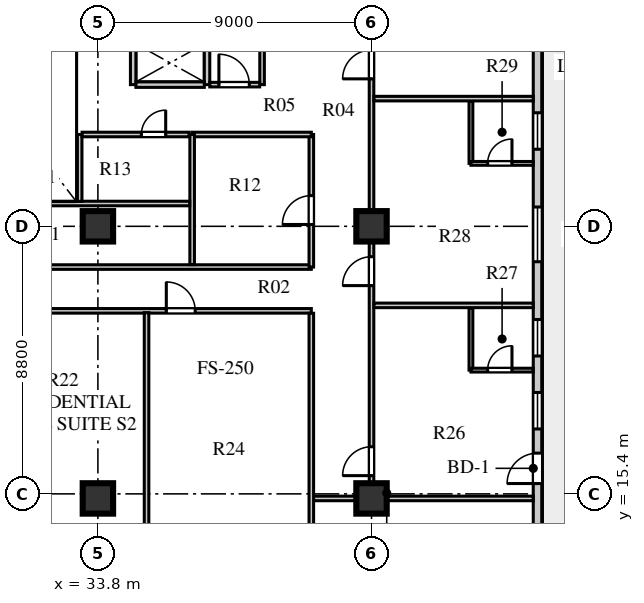
"""IFC4 building model, lengths in metres.
Left out: names, types, materials, properties, quantities, classifications, styles, units other than length and angle.
Written with IfcOpenShell. Run it as: python <this file> out.ifc"""

import sys

from ifc_helpers import new_model, si_unit, direction, frame, frame_2d, origin, origin_2d, place, context, subcontext, project, spatial, rectangle, extrude, element, fill, save


model = new_model("IFC4")
c1 = context("Model", 3, precision=1e-05, world=origin(), true_north=direction((0.0, 1.0)))
c2 = subcontext(c1, "Body", "Model", "MODEL_VIEW")
j1 = project(units=[si_unit("LENGTHUNIT", "METRE"), si_unit("PLANEANGLEUNIT", "RADIAN")], contexts=[c1])
p1 = place(None, origin())
s1 = spatial("IfcSite", under=j1, at=p1, CompositionType="ELEMENT")
p2 = place(p1, origin())
s2 = spatial("IfcBuilding", under=s1, at=p2, CompositionType="ELEMENT")
p3 = place(p2, frame((0.0, 0.0, 134.8)))
s3 = spatial("IfcBuildingStorey", under=s2, at=p3, CompositionType="ELEMENT", Elevation=134.8)
for number, where, z_axis, x_axis in (
    (1, (33.8, 15.25, 0.0), (0.0, 0.0, 1.0), (1.0, 0.0, 0.0)),
    (2, (33.8, 24.2, 0.0), (0.0, 0.0, 1.0), (1.0, 0.0, 0.0)),
    (3, (42.8, 15.25, 0.0), (0.0, 0.0, 1.0), (1.0, 0.0, 0.0)),
    (4, (42.8, 24.2, 0.0), (0.0, 0.0, 1.0), (1.0, 0.0, 0.0)),
):
    element("IfcColumn", number, at=place(p3, frame(where, z_axis=z_axis, x_axis=x_axis)), inside=s3, PredefinedType="COLUMN", context=c2, shape_type="SweptSolid", body=[
        extrude(rectangle(XDim=1.0, YDim=1.0, at=origin_2d()), origin(), (0.0, 0.0, 1.0), 3.6),
    ])
p4 = place(p3, frame((48.26, 13.33, 0.0), z_axis=(0.0, 0.0, 1.0), x_axis=(0.0, 1.0, 0.0)))
e5 = element("IfcWall", 5, at=p4, inside=s3, PredefinedType="STANDARD", context=c2, shape_type="SweptSolid", body=[
    extrude(rectangle(XDim=30.54, YDim=0.28, at=frame_2d((15.27, 0.0))), origin(), (0.0, 0.0, 1.0), 3.6),
])
p5 = place(p4, frame((2.41, 0.0, 0.0)))
e6 = element("IfcOpeningElement", 6, at=p5, cuts=e5, PredefinedType="OPENING", context=c2, shape_type="SweptSolid", body=[
    extrude(rectangle(XDim=1.0, YDim=2.05, at=frame_2d((0.5, 1.025))), frame((0.0, 0.15, 0.0), z_axis=(0.0, -1.0, 0.0), x_axis=(1.0, 0.0, 0.0)), (0.0, 0.0, 1.0), 0.3),
])
p6 = place(p4, frame((4.205, 0.0, 0.8)))
e7 = element("IfcOpeningElement", 7, at=p6, cuts=e5, PredefinedType="OPENING", context=c2, shape_type="SweptSolid", body=[
    extrude(rectangle(XDim=1.2, YDim=1.75, at=frame_2d((0.6, 0.875))), frame((0.0, 0.15, 0.0), z_axis=(0.0, -1.0, 0.0), x_axis=(1.0, 0.0, 0.0)), (0.0, 0.0, 1.0), 0.3),
])
p7 = place(p4, frame((6.605, 0.0, 0.8)))
e8 = element("IfcOpeningElement", 8, at=p7, cuts=e5, PredefinedType="OPENING", context=c2, shape_type="SweptSolid", body=[
    extrude(rectangle(XDim=1.2, YDim=1.75, at=frame_2d((0.6, 0.875))), frame((0.0, 0.15, 0.0), z_axis=(0.0, -1.0, 0.0), x_axis=(1.0, 0.0, 0.0)), (0.0, 0.0, 1.0), 0.3),
])
p8 = place(p4, frame((9.705, 0.0, 0.8)))
e9 = element("IfcOpeningElement", 9, at=p8, cuts=e5, PredefinedType="OPENING", context=c2, shape_type="SweptSolid", body=[
    extrude(rectangle(XDim=1.8, YDim=2.0, at=frame_2d((0.9, 1.0))), frame((0.0, 0.15, 0.0), z_axis=(0.0, -1.0, 0.0), x_axis=(1.0, 0.0, 0.0)), (0.0, 0.0, 1.0), 0.3),
])
p9 = place(p4, frame((13.405, 0.0, 0.8)))
e10 = element("IfcOpeningElement", 10, at=p9, cuts=e5, PredefinedType="OPENING", context=c2, shape_type="SweptSolid", body=[
    extrude(rectangle(XDim=1.2, YDim=1.75, at=frame_2d((0.6, 0.875))), frame((0.0, 0.15, 0.0), z_axis=(0.0, -1.0, 0.0), x_axis=(1.0, 0.0, 0.0)), (0.0, 0.0, 1.0), 0.3),
])
p10 = place(p4, frame((16.805, 0.0, 0.8)))
e11 = element("IfcOpeningElement", 11, at=p10, cuts=e5, PredefinedType="OPENING", context=c2, shape_type="SweptSolid", body=[
    extrude(rectangle(XDim=1.2, YDim=1.75, at=frame_2d((0.6, 0.875))), frame((0.0, 0.15, 0.0), z_axis=(0.0, -1.0, 0.0), x_axis=(1.0, 0.0, 0.0)), (0.0, 0.0, 1.0), 0.3),
])
p11 = place(p4, frame((20.205, 0.0, 0.8)))
e12 = element("IfcOpeningElement", 12, at=p11, cuts=e5, PredefinedType="OPENING", context=c2, shape_type="SweptSolid", body=[
    extrude(rectangle(XDim=1.2, YDim=1.75, at=frame_2d((0.6, 0.875))), frame((0.0, 0.15, 0.0), z_axis=(0.0, -1.0, 0.0), x_axis=(1.0, 0.0, 0.0)), (0.0, 0.0, 1.0), 0.3),
])
p12 = place(p4, frame((23.08, 0.0, 0.8)))
e13 = element("IfcOpeningElement", 13, at=p12, cuts=e5, PredefinedType="OPENING", context=c2, shape_type="SweptSolid", body=[
    extrude(rectangle(XDim=2.1, YDim=1.95, at=frame_2d((1.05, 0.975))), frame((0.0, 0.15, 0.0), z_axis=(0.0, -1.0, 0.0), x_axis=(1.0, 0.0, 0.0)), (0.0, 0.0, 1.0), 0.3),
])
p13 = place(p4, frame((26.905, 0.0, 0.8)))
e14 = element("IfcOpeningElement", 14, at=p13, cuts=e5, PredefinedType="OPENING", context=c2, shape_type="SweptSolid", body=[
    extrude(rectangle(XDim=1.2, YDim=1.75, at=frame_2d((0.6, 0.875))), frame((0.0, 0.15, 0.0), z_axis=(0.0, -1.0, 0.0), x_axis=(1.0, 0.0, 0.0)), (0.0, 0.0, 1.0), 0.3),
])
p14 = place(p3, frame((34.96, 28.86, 0.0), z_axis=(0.0, 0.0, 1.0), x_axis=(0.0, 1.0, 0.0)))
e15 = element("IfcWall", 15, at=p14, inside=s3, PredefinedType="SOLIDWALL", context=c2, shape_type="SweptSolid", body=[
    extrude(rectangle(XDim=4.22, YDim=0.18, at=frame_2d((2.11, 0.0))), origin(), (0.0, 0.0, 1.0), 3.6),
])
p15 = place(p3, frame((37.39, 28.86, 0.0), z_axis=(0.0, 0.0, 1.0), x_axis=(0.0, 1.0, 0.0)))
e16 = element("IfcWall", 16, at=p15, inside=s3, PredefinedType="SOLIDWALL", context=c2, shape_type="SweptSolid", body=[
    extrude(rectangle(XDim=4.22, YDim=0.18, at=frame_2d((2.11, 0.0))), origin(), (0.0, 0.0, 1.0), 3.6),
])
p16 = place(p15, frame((2.1, 0.0, 0.0)))
e17 = element("IfcOpeningElement", 17, at=p16, cuts=e16, PredefinedType="OPENING", context=c2, shape_type="SweptSolid", body=[
    extrude(rectangle(XDim=1.2, YDim=2.12, at=frame_2d((0.6, 1.06))), frame((0.0, 0.1, 0.0), z_axis=(0.0, -1.0, 0.0), x_axis=(1.0, 0.0, 0.0)), (0.0, 0.0, 1.0), 0.2),
])
p17 = place(p3, frame((35.05, 28.86, 0.0), z_axis=(0.0, 0.0, 1.0), x_axis=(1.0, 0.0, 0.0)))
e18 = element("IfcWall", 18, at=p17, inside=s3, PredefinedType="SOLIDWALL", context=c2, shape_type="SweptSolid", body=[
    extrude(rectangle(XDim=2.25, YDim=0.18, at=frame_2d((1.125, 0.0))), origin(), (0.0, 0.0, 1.0), 3.6),
])
p18 = place(p3, frame((39.2, 28.86, 0.0), z_axis=(0.0, 0.0, 1.0), x_axis=(0.0, 1.0, 0.0)))
e19 = element("IfcWall", 19, at=p18, inside=s3, PredefinedType="PARTITIONING", context=c2, shape_type="SweptSolid", body=[
    extrude(rectangle(XDim=4.22, YDim=0.15, at=frame_2d((2.11, 0.0))), origin(), (0.0, 0.0, 1.0), 3.6),
])
p19 = place(p3, frame((37.48, 28.86, 0.0), z_axis=(0.0, 0.0, 1.0), x_axis=(1.0, 0.0, 0.0)))
e20 = element("IfcWall", 20, at=p19, inside=s3, PredefinedType="PARTITIONING", context=c2, shape_type="SweptSolid", body=[
    extrude(rectangle(XDim=1.64, YDim=0.15, at=frame_2d((0.82, 0.0))), origin(), (0.0, 0.0, 1.0), 3.6),
])
p20 = place(p19, frame((0.3, 0.0, 0.0)))
e21 = element("IfcOpeningElement", 21, at=p20, cuts=e20, PredefinedType="OPENING", context=c2, shape_type="SweptSolid", body=[
    extrude(rectangle(XDim=1.0, YDim=2.1, at=frame_2d((0.5, 1.05))), frame((0.0, 0.085, 0.0), z_axis=(0.0, -1.0, 0.0), x_axis=(1.0, 0.0, 0.0)), (0.0, 0.0, 1.0), 0.17),
])
p21 = place(p3, frame((25.22, 21.42, 0.0), z_axis=(0.0, 0.0, 1.0), x_axis=(1.0, 0.0, 0.0)))
e22 = element("IfcWall", 22, at=p21, inside=s3, PredefinedType="PARTITIONING", context=c2, shape_type="SweptSolid", body=[
    extrude(rectangle(XDim=15.6, YDim=0.15, at=frame_2d((7.8, 0.0))), origin(), (0.0, 0.0, 1.0), 3.2),
])
p22 = place(p21, frame((0.73, 0.0, 0.0)))
e23 = element("IfcOpeningElement", 23, at=p22, cuts=e22, PredefinedType="OPENING", context=c2, shape_type="SweptSolid", body=[
    extrude(rectangle(XDim=0.95, YDim=2.1, at=frame_2d((0.475, 1.05))), frame((0.0, 0.085, 0.0), z_axis=(0.0, -1.0, 0.0), x_axis=(1.0, 0.0, 0.0)), (0.0, 0.0, 1.0), 0.17),
])
p23 = place(p21, frame((5.23, 0.0, 0.0)))
e24 = element("IfcOpeningElement", 24, at=p23, cuts=e22, PredefinedType="OPENING", context=c2, shape_type="SweptSolid", body=[
    extrude(rectangle(XDim=0.95, YDim=2.1, at=frame_2d((0.475, 1.05))), frame((0.0, 0.085, 0.0), z_axis=(0.0, -1.0, 0.0), x_axis=(1.0, 0.0, 0.0)), (0.0, 0.0, 1.0), 0.17),
])
p24 = place(p21, frame((10.83, 0.0, 0.0)))
e25 = element("IfcOpeningElement", 25, at=p24, cuts=e22, PredefinedType="OPENING", context=c2, shape_type="SweptSolid", body=[
    extrude(rectangle(XDim=0.95, YDim=2.1, at=frame_2d((0.475, 1.05))), frame((0.0, 0.085, 0.0), z_axis=(0.0, -1.0, 0.0), x_axis=(1.0, 0.0, 0.0)), (0.0, 0.0, 1.0), 0.17),
])
p25 = place(p3, frame((27.15, 22.86, 0.0), z_axis=(0.0, 0.0, 1.0), x_axis=(1.0, 0.0, 0.0)))
e26 = element("IfcWall", 26, at=p25, inside=s3, PredefinedType="PARTITIONING", context=c2, shape_type="SweptSolid", body=[
    extrude(rectangle(XDim=13.67, YDim=0.15, at=frame_2d((6.835, 0.0))), origin(), (0.0, 0.0, 1.0), 3.6),
])
p26 = place(p25, frame((2.2, 0.0, 0.0)))
e27 = element("IfcOpeningElement", 27, at=p26, cuts=e26, PredefinedType="OPENING", context=c2, shape_type="SweptSolid", body=[
    extrude(rectangle(XDim=0.9, YDim=2.08, at=frame_2d((0.45, 1.04))), frame((0.0, 0.085, 0.0), z_axis=(0.0, -1.0, 0.0), x_axis=(1.0, 0.0, 0.0)), (0.0, 0.0, 1.0), 0.17),
])
p27 = place(p3, frame((42.8, 15.25, 0.0), z_axis=(0.0, 0.0, 1.0), x_axis=(0.0, 1.0, 0.0)))
e28 = element("IfcWall", 28, at=p27, inside=s3, PredefinedType="PARTITIONING", context=c2, shape_type="SweptSolid", body=[
    extrude(rectangle(XDim=26.7, YDim=0.15, at=frame_2d((13.35, 0.0))), origin(), (0.0, 0.0, 1.0), 2.95),
])
p28 = place(p27, frame((0.75, 0.0, 0.0)))
e29 = element("IfcOpeningElement", 29, at=p28, cuts=e28, PredefinedType="OPENING", context=c2, shape_type="SweptSolid", body=[
    extrude(rectangle(XDim=0.95, YDim=2.1, at=frame_2d((0.475, 1.05))), frame((0.0, 0.085, 0.0), z_axis=(0.0, -1.0, 0.0), x_axis=(1.0, 0.0, 0.0)), (0.0, 0.0, 1.0), 0.17),
])
p29 = place(p27, frame((7.0, 0.0, 0.0)))
e30 = element("IfcOpeningElement", 30, at=p29, cuts=e28, PredefinedType="OPENING", context=c2, shape_type="SweptSolid", body=[
    extrude(rectangle(XDim=0.95, YDim=2.1, at=frame_2d((0.475, 1.05))), frame((0.0, 0.085, 0.0), z_axis=(0.0, -1.0, 0.0), x_axis=(1.0, 0.0, 0.0)), (0.0, 0.0, 1.0), 0.17),
])
p30 = place(p27, frame((13.8, 0.0, 0.0)))
e31 = element("IfcOpeningElement", 31, at=p30, cuts=e28, PredefinedType="OPENING", context=c2, shape_type="SweptSolid", body=[
    extrude(rectangle(XDim=0.95, YDim=2.1, at=frame_2d((0.475, 1.05))), frame((0.0, 0.085, 0.0), z_axis=(0.0, -1.0, 0.0), x_axis=(1.0, 0.0, 0.0)), (0.0, 0.0, 1.0), 0.17),
])
p31 = place(p27, frame((20.6, 0.0, 0.0)))
e32 = element("IfcOpeningElement", 32, at=p31, cuts=e28, PredefinedType="OPENING", context=c2, shape_type="SweptSolid", body=[
    extrude(rectangle(XDim=0.95, YDim=2.1, at=frame_2d((0.475, 1.05))), frame((0.0, 0.085, 0.0), z_axis=(0.0, -1.0, 0.0), x_axis=(1.0, 0.0, 0.0)), (0.0, 0.0, 1.0), 0.17),
])
p32 = place(p3, frame((40.82, 15.25, 0.0), z_axis=(0.0, 0.0, 1.0), x_axis=(1.0, 0.0, 0.0)))
e33 = element("IfcWall", 33, at=p32, inside=s3, PredefinedType="PARTITIONING", context=c2, shape_type="SweptSolid", body=[
    extrude(rectangle(XDim=7.3, YDim=0.15, at=frame_2d((3.65, 0.0))), origin(), (0.0, 0.0, 1.0), 2.95),
])
p33 = place(p3, frame((40.82, 22.86, 0.0), z_axis=(0.0, 0.0, 1.0), x_axis=(0.0, 1.0, 0.0)))
e34 = element("IfcWall", 34, at=p33, inside=s3, PredefinedType="PARTITIONING", context=c2, shape_type="SweptSolid", body=[
    extrude(rectangle(XDim=4.36, YDim=0.15, at=frame_2d((2.18, 0.0))), origin(), (0.0, 0.0, 1.0), 3.6),
])
p34 = place(p33, frame((1.4, 0.0, 0.0)))
e35 = element("IfcOpeningElement", 35, at=p34, cuts=e34, PredefinedType="OPENING", context=c2, shape_type="SweptSolid", body=[
    extrude(rectangle(XDim=0.95, YDim=2.1, at=frame_2d((0.475, 1.05))), frame((0.0, 0.085, 0.0), z_axis=(0.0, -1.0, 0.0), x_axis=(1.0, 0.0, 0.0)), (0.0, 0.0, 1.0), 0.17),
])
p35 = place(p3, frame((36.9, 27.22, 0.0), z_axis=(0.0, 0.0, 1.0), x_axis=(1.0, 0.0, 0.0)))
e36 = element("IfcWall", 36, at=p35, inside=s3, PredefinedType="PARTITIONING", context=c2, shape_type="SweptSolid", body=[
    extrude(rectangle(XDim=3.92, YDim=0.15, at=frame_2d((1.96, 0.0))), origin(), (0.0, 0.0, 1.0), 3.2),
])
p36 = place(p3, frame((36.9, 22.94, 0.0), z_axis=(0.0, 0.0, 1.0), x_axis=(0.0, 1.0, 0.0)))
e37 = element("IfcWall", 37, at=p36, inside=s3, PredefinedType="PARTITIONING", context=c2, shape_type="SweptSolid", body=[
    extrude(rectangle(XDim=4.28, YDim=0.15, at=frame_2d((2.14, 0.0))), origin(), (0.0, 0.0, 1.0), 3.6),
])
p37 = place(p3, frame((27.15, 24.95, 0.0), z_axis=(0.0, 0.0, 1.0), x_axis=(1.0, 0.0, 0.0)))
e38 = element("IfcWall", 38, at=p37, inside=s3, PredefinedType="PARTITIONING", context=c2, shape_type="SweptSolid", body=[
    extrude(rectangle(XDim=9.67, YDim=0.15, at=frame_2d((4.835, 0.0))), origin(), (0.0, 0.0, 1.0), 3.05),
])
p38 = place(p3, frame((33.2, 25.02, 0.0), z_axis=(0.0, 0.0, 1.0), x_axis=(0.0, 1.0, 0.0)))
e39 = element("IfcWall", 39, at=p38, inside=s3, PredefinedType="PARTITIONING", context=c2, shape_type="SweptSolid", body=[
    extrude(rectangle(XDim=2.2, YDim=0.15, at=frame_2d((1.1, 0.0))), origin(), (0.0, 0.0, 1.0), 3.05),
])
p39 = place(p3, frame((33.28, 27.22, 0.0), z_axis=(0.0, 0.0, 1.0), x_axis=(1.0, 0.0, 0.0)))
e40 = element("IfcWall", 40, at=p39, inside=s3, PredefinedType="PARTITIONING", context=c2, shape_type="SweptSolid", body=[
    extrude(rectangle(XDim=3.52, YDim=0.15, at=frame_2d((1.76, 0.0))), origin(), (0.0, 0.0, 1.0), 3.2),
])
p40 = place(p39, frame((1.95, 0.0, 0.0)))
e41 = element("IfcOpeningElement", 41, at=p40, cuts=e40, PredefinedType="OPENING", context=c2, shape_type="SweptSolid", body=[
    extrude(rectangle(XDim=0.8, YDim=2.05, at=frame_2d((0.4, 1.025))), frame((0.0, 0.085, 0.0), z_axis=(0.0, -1.0, 0.0), x_axis=(1.0, 0.0, 0.0)), (0.0, 0.0, 1.0), 0.17),
])
p41 = place(p3, frame((40.82, 10.28, 0.0), z_axis=(0.0, 0.0, 1.0), x_axis=(0.0, 1.0, 0.0)))
e42 = element("IfcWall", 42, at=p41, inside=s3, PredefinedType="PARTITIONING", context=c2, shape_type="SweptSolid", body=[
    extrude(rectangle(XDim=11.06, YDim=0.15, at=frame_2d((5.53, 0.0))), origin(), (0.0, 0.0, 1.0), 3.6),
])
p42 = place(p3, frame((35.4, 10.28, 0.0), z_axis=(0.0, 0.0, 1.0), x_axis=(0.0, 1.0, 0.0)))
e43 = element("IfcWall", 43, at=p42, inside=s3, PredefinedType="PARTITIONING", context=c2, shape_type="SweptSolid", body=[
    extrude(rectangle(XDim=11.08, YDim=0.15, at=frame_2d((5.54, 0.0))), origin(), (0.0, 0.0, 1.0), 3.6),
])
p43 = place(p3, frame((46.07, 19.47, 0.0), z_axis=(0.0, 0.0, 1.0), x_axis=(0.0, 1.0, 0.0)))
e44 = element("IfcWall", 44, at=p43, inside=s3, PredefinedType="PLUMBINGWALL", context=c2, shape_type="SweptSolid", body=[
    extrude(rectangle(XDim=2.05, YDim=0.125, at=frame_2d((1.025, 0.0))), origin(), (0.0, 0.0, 1.0), 3.6),
])
p44 = place(p3, frame((46.07, 19.47, 0.0), z_axis=(0.0, 0.0, 1.0), x_axis=(1.0, 0.0, 0.0)))
e45 = element("IfcWall", 45, at=p44, inside=s3, PredefinedType="PLUMBINGWALL", context=c2, shape_type="SweptSolid", body=[
    extrude(rectangle(XDim=2.05, YDim=0.125, at=frame_2d((1.025, 0.0))), origin(), (0.0, 0.0, 1.0), 3.6),
])
p45 = place(p44, frame((0.55, 0.0, 0.0)))
e46 = element("IfcOpeningElement", 46, at=p45, cuts=e45, PredefinedType="OPENING", context=c2, shape_type="SweptSolid", body=[
    extrude(rectangle(XDim=0.8, YDim=2.05, at=frame_2d((0.4, 1.025))), frame((0.0, 0.073, 0.0), z_axis=(0.0, -1.0, 0.0), x_axis=(1.0, 0.0, 0.0)), (0.0, 0.0, 1.0), 0.145),
])
p46 = place(p3, frame((42.88, 21.6, 0.0), z_axis=(0.0, 0.0, 1.0), x_axis=(1.0, 0.0, 0.0)))
e47 = element("IfcWall", 47, at=p46, inside=s3, PredefinedType="PARTITIONING", context=c2, shape_type="SweptSolid", body=[
    extrude(rectangle(XDim=5.24, YDim=0.15, at=frame_2d((2.62, 0.0))), origin(), (0.0, 0.0, 1.0), 3.6),
])
p47 = place(p3, frame((46.07, 26.27, 0.0), z_axis=(0.0, 0.0, 1.0), x_axis=(0.0, 1.0, 0.0)))
e48 = element("IfcWall", 48, at=p47, inside=s3, PredefinedType="PLUMBINGWALL", context=c2, shape_type="SweptSolid", body=[
    extrude(rectangle(XDim=2.05, YDim=0.125, at=frame_2d((1.025, 0.0))), origin(), (0.0, 0.0, 1.0), 3.6),
])
p48 = place(p3, frame((46.07, 26.27, 0.0), z_axis=(0.0, 0.0, 1.0), x_axis=(1.0, 0.0, 0.0)))
e49 = element("IfcWall", 49, at=p48, inside=s3, PredefinedType="PLUMBINGWALL", context=c2, shape_type="SweptSolid", body=[
    extrude(rectangle(XDim=2.05, YDim=0.125, at=frame_2d((1.025, 0.0))), origin(), (0.0, 0.0, 1.0), 3.6),
])
p49 = place(p48, frame((0.55, 0.0, 0.0)))
e50 = element("IfcOpeningElement", 50, at=p49, cuts=e49, PredefinedType="OPENING", context=c2, shape_type="SweptSolid", body=[
    extrude(rectangle(XDim=0.8, YDim=2.05, at=frame_2d((0.4, 1.025))), frame((0.0, 0.073, 0.0), z_axis=(0.0, -1.0, 0.0), x_axis=(1.0, 0.0, 0.0)), (0.0, 0.0, 1.0), 0.145),
])
p50 = place(p3, frame((42.88, 28.4, 0.0), z_axis=(0.0, 0.0, 1.0), x_axis=(1.0, 0.0, 0.0)))
e51 = element("IfcWall", 51, at=p50, inside=s3, PredefinedType="PARTITIONING", context=c2, shape_type="SweptSolid", body=[
    extrude(rectangle(XDim=5.24, YDim=0.15, at=frame_2d((2.62, 0.0))), origin(), (0.0, 0.0, 1.0), 3.6),
])
p51 = place(p5, frame((1.0, 0.0, 0.0), z_axis=(0.0, 0.0, 1.0), x_axis=(-1.0, 0.0, 0.0)))
e52 = element("IfcDoor", 52, at=p51, inside=s3, OperationType="SINGLE_SWING_RIGHT", PredefinedType="DOOR", context=c2, shape_type="SweptSolid", body=[
    extrude(rectangle(XDim=1.0, YDim=2.05, at=frame_2d((0.5, 1.025))), frame((0.0, 0.025, 0.0), z_axis=(0.0, -1.0, 0.0), x_axis=(1.0, 0.0, 0.0)), (0.0, 0.0, 1.0), 0.05),
])
fill(e6, e52)
p52 = place(p6, origin())
e53 = element("IfcWindow", 53, at=p52, inside=s3, PartitioningType="SINGLE_PANEL", PredefinedType="WINDOW", context=c2, shape_type="SweptSolid", body=[
    extrude(rectangle(XDim=1.2, YDim=1.75, at=frame_2d((0.6, 0.875))), frame((0.0, 0.03, 0.0), z_axis=(0.0, -1.0, 0.0), x_axis=(1.0, 0.0, 0.0)), (0.0, 0.0, 1.0), 0.06),
])
fill(e7, e53)
p53 = place(p7, origin())
e54 = element("IfcWindow", 54, at=p53, inside=s3, PartitioningType="SINGLE_PANEL", PredefinedType="WINDOW", context=c2, shape_type="SweptSolid", body=[
    extrude(rectangle(XDim=1.2, YDim=1.75, at=frame_2d((0.6, 0.875))), frame((0.0, 0.03, 0.0), z_axis=(0.0, -1.0, 0.0), x_axis=(1.0, 0.0, 0.0)), (0.0, 0.0, 1.0), 0.06),
])
fill(e8, e54)
p54 = place(p8, origin())
e55 = element("IfcWindow", 55, at=p54, inside=s3, PartitioningType="SINGLE_PANEL", PredefinedType="WINDOW", context=c2, shape_type="SweptSolid", body=[
    extrude(rectangle(XDim=1.8, YDim=2.0, at=frame_2d((0.9, 1.0))), frame((0.0, 0.03, 0.0), z_axis=(0.0, -1.0, 0.0), x_axis=(1.0, 0.0, 0.0)), (0.0, 0.0, 1.0), 0.06),
])
fill(e9, e55)
p55 = place(p9, origin())
e56 = element("IfcWindow", 56, at=p55, inside=s3, PartitioningType="SINGLE_PANEL", PredefinedType="WINDOW", context=c2, shape_type="SweptSolid", body=[
    extrude(rectangle(XDim=1.2, YDim=1.75, at=frame_2d((0.6, 0.875))), frame((0.0, 0.03, 0.0), z_axis=(0.0, -1.0, 0.0), x_axis=(1.0, 0.0, 0.0)), (0.0, 0.0, 1.0), 0.06),
])
fill(e10, e56)
p56 = place(p20, origin())
e57 = element("IfcDoor", 57, at=p56, inside=s3, OperationType="SINGLE_SWING_LEFT", PredefinedType="DOOR", context=c2, shape_type="SweptSolid", body=[
    extrude(rectangle(XDim=1.0, YDim=2.1, at=frame_2d((0.5, 1.05))), frame((0.0, 0.025, 0.0), z_axis=(0.0, -1.0, 0.0), x_axis=(1.0, 0.0, 0.0)), (0.0, 0.0, 1.0), 0.05),
])
fill(e21, e57)
p57 = place(p40, frame((0.8, 0.0, 0.0), z_axis=(0.0, 0.0, 1.0), x_axis=(-1.0, 0.0, 0.0)))
e58 = element("IfcDoor", 58, at=p57, inside=s3, OperationType="SINGLE_SWING_LEFT", PredefinedType="DOOR", context=c2, shape_type="SweptSolid", body=[
    extrude(rectangle(XDim=0.8, YDim=2.05, at=frame_2d((0.4, 1.025))), frame((0.0, 0.025, 0.0), z_axis=(0.0, -1.0, 0.0), x_axis=(1.0, 0.0, 0.0)), (0.0, 0.0, 1.0), 0.05),
])
fill(e41, e58)
p58 = place(p34, frame((0.95, 0.0, 0.0), z_axis=(0.0, 0.0, 1.0), x_axis=(-1.0, 0.0, 0.0)))
e59 = element("IfcDoor", 59, at=p58, inside=s3, OperationType="SINGLE_SWING_RIGHT", PredefinedType="DOOR", context=c2, shape_type="SweptSolid", body=[
    extrude(rectangle(XDim=0.95, YDim=2.1, at=frame_2d((0.475, 1.05))), frame((0.0, 0.025, 0.0), z_axis=(0.0, -1.0, 0.0), x_axis=(1.0, 0.0, 0.0)), (0.0, 0.0, 1.0), 0.05),
])
fill(e35, e59)
p59 = place(p24, frame((0.95, 0.0, 0.0), z_axis=(0.0, 0.0, 1.0), x_axis=(-1.0, 0.0, 0.0)))
e60 = element("IfcDoor", 60, at=p59, inside=s3, OperationType="SINGLE_SWING_RIGHT", PredefinedType="DOOR", context=c2, shape_type="SweptSolid", body=[
    extrude(rectangle(XDim=0.95, YDim=2.1, at=frame_2d((0.475, 1.05))), frame((0.0, 0.025, 0.0), z_axis=(0.0, -1.0, 0.0), x_axis=(1.0, 0.0, 0.0)), (0.0, 0.0, 1.0), 0.05),
])
fill(e25, e60)
p60 = place(p28, origin())
e61 = element("IfcDoor", 61, at=p60, inside=s3, OperationType="SINGLE_SWING_LEFT", PredefinedType="DOOR", context=c2, shape_type="SweptSolid", body=[
    extrude(rectangle(XDim=0.95, YDim=2.1, at=frame_2d((0.475, 1.05))), frame((0.0, 0.025, 0.0), z_axis=(0.0, -1.0, 0.0), x_axis=(1.0, 0.0, 0.0)), (0.0, 0.0, 1.0), 0.05),
])
fill(e29, e61)
p61 = place(p45, frame((0.8, 0.0, 0.0), z_axis=(0.0, 0.0, 1.0), x_axis=(-1.0, 0.0, 0.0)))
e62 = element("IfcDoor", 62, at=p61, inside=s3, OperationType="SINGLE_SWING_LEFT", PredefinedType="DOOR", context=c2, shape_type="SweptSolid", body=[
    extrude(rectangle(XDim=0.8, YDim=2.05, at=frame_2d((0.4, 1.025))), frame((0.0, 0.025, 0.0), z_axis=(0.0, -1.0, 0.0), x_axis=(1.0, 0.0, 0.0)), (0.0, 0.0, 1.0), 0.05),
])
fill(e46, e62)
p62 = place(p29, origin())
e63 = element("IfcDoor", 63, at=p62, inside=s3, OperationType="SINGLE_SWING_LEFT", PredefinedType="DOOR", context=c2, shape_type="SweptSolid", body=[
    extrude(rectangle(XDim=0.95, YDim=2.1, at=frame_2d((0.475, 1.05))), frame((0.0, 0.025, 0.0), z_axis=(0.0, -1.0, 0.0), x_axis=(1.0, 0.0, 0.0)), (0.0, 0.0, 1.0), 0.05),
])
fill(e30, e63)
p63 = place(p49, frame((0.8, 0.0, 0.0), z_axis=(0.0, 0.0, 1.0), x_axis=(-1.0, 0.0, 0.0)))
e64 = element("IfcDoor", 64, at=p63, inside=s3, OperationType="SINGLE_SWING_LEFT", PredefinedType="DOOR", context=c2, shape_type="SweptSolid", body=[
    extrude(rectangle(XDim=0.8, YDim=2.05, at=frame_2d((0.4, 1.025))), frame((0.0, 0.025, 0.0), z_axis=(0.0, -1.0, 0.0), x_axis=(1.0, 0.0, 0.0)), (0.0, 0.0, 1.0), 0.05),
])
fill(e50, e64)
p64 = place(p30, origin())
e65 = element("IfcDoor", 65, at=p64, inside=s3, OperationType="SINGLE_SWING_LEFT", PredefinedType="DOOR", context=c2, shape_type="SweptSolid", body=[
    extrude(rectangle(XDim=0.95, YDim=2.1, at=frame_2d((0.475, 1.05))), frame((0.0, 0.025, 0.0), z_axis=(0.0, -1.0, 0.0), x_axis=(1.0, 0.0, 0.0)), (0.0, 0.0, 1.0), 0.05),
])
fill(e31, e65)
save(model, sys.argv[1])
